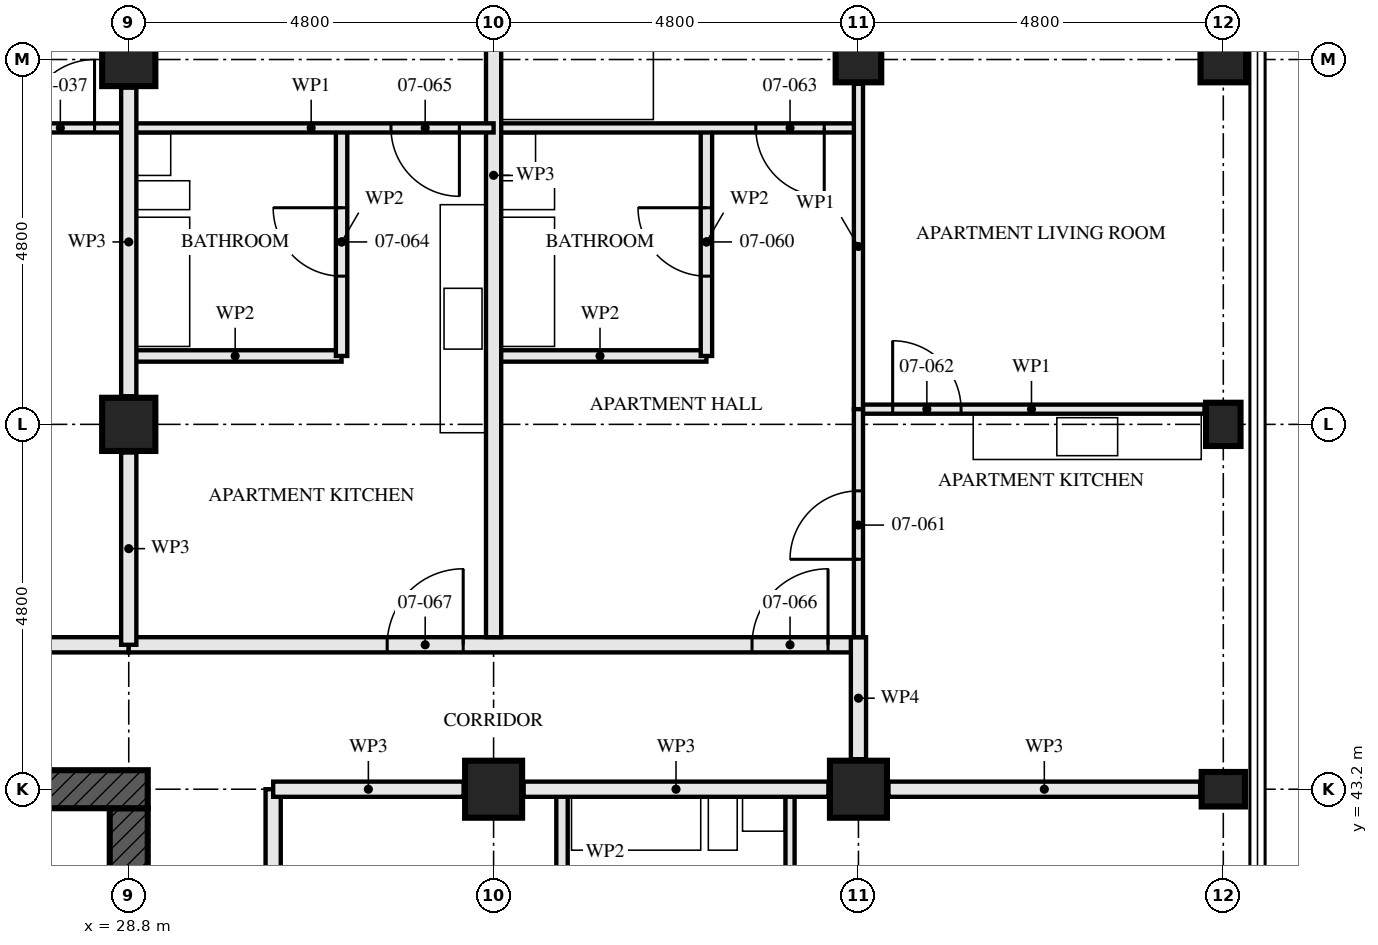
"""IFC4 building model, lengths in metres.
Left out: names, types, materials, properties, quantities, classifications, styles, units other than length and angle.
Written with IfcOpenShell. Run it as: python <this file> out.ifc"""

import sys

from ifc_helpers import new_model, si_unit, direction, frame, frame_2d, origin, origin_2d, place, context, subcontext, project, spatial, rectangle, hollow_rectangle, i_section, extrude, element, fill, save


model = new_model("IFC4")
c1 = context("Model", 3, precision=1e-05, world=origin(), true_north=direction((0.0, 1.0)))
c2 = subcontext(c1, "Body", "Model", "MODEL_VIEW")
j1 = project(units=[si_unit("LENGTHUNIT", "METRE"), si_unit("PLANEANGLEUNIT", "RADIAN")], contexts=[c1])
p1 = place(None, origin())
s1 = spatial("IfcSite", under=j1, at=p1, CompositionType="ELEMENT")
p2 = place(p1, origin())
s2 = spatial("IfcBuilding", under=s1, at=p2, CompositionType="ELEMENT")
p3 = place(p2, frame((0.0, 0.0, 30.5)))
s3 = spatial("IfcBuildingStorey", under=s2, at=p3, CompositionType="ELEMENT", Elevation=30.5)
for number, where, z_axis, x_axis in (
    (1, (28.8, 48.0, 0.0), (0.0, 0.0, 1.0), (1.0, 0.0, 0.0)),
    (2, (28.8, 52.8, 0.0), (0.0, 0.0, 1.0), (1.0, 0.0, 0.0)),
):
    element("IfcColumn", number, at=place(p3, frame(where, z_axis=z_axis, x_axis=x_axis)), inside=s3, PredefinedType="COLUMN", context=c2, shape_type="SweptSolid", body=[
        extrude(hollow_rectangle(XDim=0.7, YDim=0.7, WallThickness=0.06, at=origin_2d()), origin(), (0.0, 0.0, 1.0), 3.5),
    ])
for number, where, z_axis, x_axis in (
    (3, (33.6, 43.2, 0.0), (0.0, 0.0, 1.0), (0.0, 1.0, 0.0)),
    (4, (38.4, 43.2, 0.0), (0.0, 0.0, 1.0), (0.0, 1.0, 0.0)),
):
    element("IfcColumn", number, at=place(p3, frame(where, z_axis=z_axis, x_axis=x_axis)), inside=s3, PredefinedType="COLUMN", context=c2, shape_type="SweptSolid", body=[
        extrude(hollow_rectangle(XDim=0.75, YDim=0.75, WallThickness=0.08, at=origin_2d()), origin(), (0.0, 0.0, 1.0), 3.5),
    ])
p4 = place(p3, frame((38.4, 52.8, 0.0), z_axis=(0.0, 0.0, 1.0), x_axis=(0.0, 1.0, 0.0)))
e5 = element("IfcColumn", 5, at=p4, inside=s3, PredefinedType="COLUMN", context=c2, shape_type="SweptSolid", body=[
    extrude(hollow_rectangle(XDim=0.6, YDim=0.6, WallThickness=0.05, at=origin_2d()), origin(), (0.0, 0.0, 1.0), 3.5),
])
for number, where, z_axis, x_axis in (
    (6, (43.2, 43.2, 0.0), (0.0, 0.0, 1.0), (0.0, 1.0, 0.0)),
    (7, (43.2, 48.0, 0.0), (0.0, 0.0, 1.0), (1.0, 0.0, 0.0)),
):
    element("IfcColumn", number, at=place(p3, frame(where, z_axis=z_axis, x_axis=x_axis)), inside=s3, PredefinedType="COLUMN", context=c2, shape_type="SweptSolid", body=[
        extrude(i_section(OverallWidth=0.454, OverallDepth=0.569, WebThickness=0.078, FlangeThickness=0.125, FilletRadius=0.015, at=origin_2d()), origin(), (0.0, 0.0, 1.0), 3.5),
    ])
p5 = place(p3, frame((43.2, 52.8, 0.0), z_axis=(0.0, 0.0, 1.0), x_axis=(0.0, 1.0, 0.0)))
e8 = element("IfcColumn", 8, at=p5, inside=s3, PredefinedType="COLUMN", context=c2, shape_type="SweptSolid", body=[
    extrude(hollow_rectangle(XDim=0.6, YDim=0.6, WallThickness=0.05, at=origin_2d()), origin(), (0.0, 0.0, 1.0), 3.5),
])
p6 = place(p3, frame((29.05, 43.2, -0.17), z_axis=(0.0, 0.0, 1.0), x_axis=(-1.0, 0.0, 0.0)))
e9 = element("IfcWall", 9, at=p6, inside=s3, PredefinedType="SHEAR", context=c2, shape_type="SweptSolid", body=[
    extrude(rectangle(XDim=14.9, YDim=0.5, at=frame_2d((7.45, 0.0))), origin(), (0.0, 0.0, 1.0), 3.5),
])
p7 = place(p6, frame((6.85, 0.0, 0.17)))
e10 = element("IfcOpeningElement", 10, at=p7, cuts=e9, PredefinedType="OPENING", context=c2, shape_type="SweptSolid", body=[
    extrude(rectangle(XDim=1.2, YDim=2.1, at=frame_2d((0.6, 1.05))), frame((0.0, 0.26, 0.0), z_axis=(0.0, -1.0, 0.0), x_axis=(1.0, 0.0, 0.0)), (0.0, 0.0, 1.0), 0.521),
])
p8 = place(p3, frame((28.8, 29.05, -0.17), z_axis=(0.0, 0.0, 1.0), x_axis=(0.0, 1.0, 0.0)))
e11 = element("IfcWall", 11, at=p8, inside=s3, PredefinedType="SHEAR", context=c2, shape_type="SweptSolid", body=[
    extrude(rectangle(XDim=13.9, YDim=0.5, at=frame_2d((6.95, 0.0))), origin(), (0.0, 0.0, 1.0), 3.5),
])
p9 = place(p8, frame((6.35, 0.0, 0.17)))
e12 = element("IfcOpeningElement", 12, at=p9, cuts=e11, PredefinedType="OPENING", context=c2, shape_type="SweptSolid", body=[
    extrude(rectangle(XDim=1.2, YDim=2.1, at=frame_2d((0.6, 1.05))), frame((0.0, 0.26, 0.0), z_axis=(0.0, -1.0, 0.0), x_axis=(1.0, 0.0, 0.0)), (0.0, 0.0, 1.0), 0.521),
])
p10 = place(p3, frame((28.8, 51.9, 0.0), z_axis=(0.0, 0.0, 1.0), x_axis=(-1.0, 0.0, 0.0)))
e13 = element("IfcWall", 13, at=p10, inside=s3, PredefinedType="PARTITIONING", context=c2, shape_type="SweptSolid", body=[
    extrude(rectangle(XDim=4.8, YDim=0.12, at=frame_2d((2.4, 0.0))), origin(), (0.0, 0.0, 1.0), 3.33),
])
p11 = place(p10, frame((0.45, 0.0, 0.0)))
e14 = element("IfcOpeningElement", 14, at=p11, cuts=e13, PredefinedType="OPENING", context=c2, shape_type="SweptSolid", body=[
    extrude(rectangle(XDim=0.9, YDim=2.1, at=frame_2d((0.45, 1.05))), frame((0.0, 0.071, 0.0), z_axis=(0.0, -1.0, 0.0), x_axis=(1.0, 0.0, 0.0)), (0.0, 0.0, 1.0), 0.141),
])
p12 = place(p3, frame((28.8, 45.1, 0.0), z_axis=(0.0, 0.0, 1.0), x_axis=(-1.0, 0.0, 0.0)))
e15 = element("IfcWall", 15, at=p12, inside=s3, PredefinedType="PARTITIONING", context=c2, shape_type="SweptSolid", body=[
    extrude(rectangle(XDim=14.4, YDim=0.2, at=frame_2d((7.2, 0.0))), origin(), (0.0, 0.0, 1.0), 3.33),
])
p13 = place(p12, frame((5.2, 0.0, 0.0)))
e16 = element("IfcOpeningElement", 16, at=p13, cuts=e15, PredefinedType="OPENING", context=c2, shape_type="SweptSolid", body=[
    extrude(rectangle(XDim=1.0, YDim=2.1, at=frame_2d((0.5, 1.05))), frame((0.0, 0.111, 0.0), z_axis=(0.0, -1.0, 0.0), x_axis=(1.0, 0.0, 0.0)), (0.0, 0.0, 1.0), 0.221),
])
p14 = place(p12, frame((10.0, 0.0, 0.0)))
e17 = element("IfcOpeningElement", 17, at=p14, cuts=e15, PredefinedType="OPENING", context=c2, shape_type="SweptSolid", body=[
    extrude(rectangle(XDim=1.0, YDim=2.1, at=frame_2d((0.5, 1.05))), frame((0.0, 0.111, 0.0), z_axis=(0.0, -1.0, 0.0), x_axis=(1.0, 0.0, 0.0)), (0.0, 0.0, 1.0), 0.221),
])
p15 = place(p3, frame((34.5, 40.4, 0.0), z_axis=(0.0, 0.0, 1.0), x_axis=(0.0, 1.0, 0.0)))
e18 = element("IfcWall", 18, at=p15, inside=s3, PredefinedType="PARTITIONING", context=c2, shape_type="SweptSolid", body=[
    extrude(rectangle(XDim=2.8, YDim=0.15, at=frame_2d((1.4, 0.0))), origin(), (0.0, 0.0, 1.0), 3.33),
])
p16 = place(p3, frame((37.5, 38.4, 0.0), z_axis=(0.0, 0.0, 1.0), x_axis=(0.0, 1.0, 0.0)))
e19 = element("IfcWall", 19, at=p16, inside=s3, PredefinedType="PARTITIONING", context=c2, shape_type="SweptSolid", body=[
    extrude(rectangle(XDim=4.8, YDim=0.12, at=frame_2d((2.4, 0.0))), origin(), (0.0, 0.0, 1.0), 3.33),
])
p17 = place(p16, frame((0.45, 0.0, 0.0)))
e20 = element("IfcOpeningElement", 20, at=p17, cuts=e19, PredefinedType="OPENING", context=c2, shape_type="SweptSolid", body=[
    extrude(rectangle(XDim=0.9, YDim=2.1, at=frame_2d((0.45, 1.05))), frame((0.0, 0.071, 0.0), z_axis=(0.0, -1.0, 0.0), x_axis=(1.0, 0.0, 0.0)), (0.0, 0.0, 1.0), 0.141),
])
p18 = place(p3, frame((30.7, 28.8, 0.0), z_axis=(0.0, 0.0, 1.0), x_axis=(0.0, 1.0, 0.0)))
e21 = element("IfcWall", 21, at=p18, inside=s3, PredefinedType="PARTITIONING", context=c2, shape_type="SweptSolid", body=[
    extrude(rectangle(XDim=14.4, YDim=0.2, at=frame_2d((7.2, 0.0))), origin(), (0.0, 0.0, 1.0), 2.55),
])
p19 = place(p18, frame((1.4, 0.0, 0.0)))
e22 = element("IfcOpeningElement", 22, at=p19, cuts=e21, PredefinedType="OPENING", context=c2, shape_type="SweptSolid", body=[
    extrude(rectangle(XDim=1.0, YDim=2.1, at=frame_2d((0.5, 1.05))), frame((0.0, 0.111, 0.0), z_axis=(0.0, -1.0, 0.0), x_axis=(1.0, 0.0, 0.0)), (0.0, 0.0, 1.0), 0.221),
])
p20 = place(p18, frame((4.1, 0.0, 0.0)))
e23 = element("IfcOpeningElement", 23, at=p20, cuts=e21, PredefinedType="OPENING", context=c2, shape_type="SweptSolid", body=[
    extrude(rectangle(XDim=1.0, YDim=2.1, at=frame_2d((0.5, 1.05))), frame((0.0, 0.111, 0.0), z_axis=(0.0, -1.0, 0.0), x_axis=(1.0, 0.0, 0.0)), (0.0, 0.0, 1.0), 0.221),
])
p21 = place(p18, frame((5.975, 0.0, 0.0)))
e24 = element("IfcOpeningElement", 24, at=p21, cuts=e21, PredefinedType="OPENING", context=c2, shape_type="SweptSolid", body=[
    extrude(rectangle(XDim=1.0, YDim=2.1, at=frame_2d((0.5, 1.05))), frame((0.0, 0.111, 0.0), z_axis=(0.0, -1.0, 0.0), x_axis=(1.0, 0.0, 0.0)), (0.0, 0.0, 1.0), 0.221),
])
p22 = place(p18, frame((10.0, 0.0, 0.0)))
e25 = element("IfcOpeningElement", 25, at=p22, cuts=e21, PredefinedType="OPENING", context=c2, shape_type="SweptSolid", body=[
    extrude(rectangle(XDim=1.0, YDim=2.1, at=frame_2d((0.5, 1.05))), frame((0.0, 0.111, 0.0), z_axis=(0.0, -1.0, 0.0), x_axis=(1.0, 0.0, 0.0)), (0.0, 0.0, 1.0), 0.221),
])
p23 = place(p3, frame((36.4, 51.9, 0.0), z_axis=(0.0, 0.0, 1.0), x_axis=(0.0, -1.0, 0.0)))
e26 = element("IfcWall", 26, at=p23, inside=s3, PredefinedType="PARTITIONING", context=c2, shape_type="SweptSolid", body=[
    extrude(rectangle(XDim=3.0, YDim=0.15, at=frame_2d((1.5, 0.0))), origin(), (0.0, 0.0, 1.0), 3.33),
])
p24 = place(p23, frame((1.05, 0.0, 0.0)))
e27 = element("IfcOpeningElement", 27, at=p24, cuts=e26, PredefinedType="OPENING", context=c2, shape_type="SweptSolid", body=[
    extrude(rectangle(XDim=0.9, YDim=2.1, at=frame_2d((0.45, 1.05))), frame((0.0, 0.085, 0.0), z_axis=(0.0, -1.0, 0.0), x_axis=(1.0, 0.0, 0.0)), (0.0, 0.0, 1.0), 0.171),
])
p25 = place(p3, frame((36.4, 48.9, 0.0), z_axis=(0.0, 0.0, 1.0), x_axis=(-1.0, 0.0, 0.0)))
e28 = element("IfcWall", 28, at=p25, inside=s3, PredefinedType="PARTITIONING", context=c2, shape_type="SweptSolid", body=[
    extrude(rectangle(XDim=2.8, YDim=0.15, at=frame_2d((1.4, 0.0))), origin(), (0.0, 0.0, 1.0), 3.33),
])
p26 = place(p3, frame((38.4, 48.2, 0.0), z_axis=(0.0, 0.0, 1.0), x_axis=(0.0, -1.0, 0.0)))
e29 = element("IfcWall", 29, at=p26, inside=s3, PredefinedType="PARTITIONING", context=c2, shape_type="SweptSolid", body=[
    extrude(rectangle(XDim=3.0, YDim=0.12, at=frame_2d((1.5, 0.0))), origin(), (0.0, 0.0, 1.0), 2.55),
])
p27 = place(p26, frame((1.075, 0.0, 0.0)))
e30 = element("IfcOpeningElement", 30, at=p27, cuts=e29, PredefinedType="OPENING", context=c2, shape_type="SweptSolid", body=[
    extrude(rectangle(XDim=0.9, YDim=2.1, at=frame_2d((0.45, 1.05))), frame((0.0, 0.071, 0.0), z_axis=(0.0, -1.0, 0.0), x_axis=(1.0, 0.0, 0.0)), (0.0, 0.0, 1.0), 0.141),
])
p28 = place(p3, frame((42.953, 48.2, 0.0), z_axis=(0.0, 0.0, 1.0), x_axis=(-1.0, 0.0, 0.0)))
e31 = element("IfcWall", 31, at=p28, inside=s3, PredefinedType="PARTITIONING", context=c2, shape_type="SweptSolid", body=[
    extrude(rectangle(XDim=4.553, YDim=0.12, at=frame_2d((2.276, 0.0))), origin(), (0.0, 0.0, 1.0), 3.33),
])
p29 = place(p28, frame((3.203, 0.0, 0.0)))
e32 = element("IfcOpeningElement", 32, at=p29, cuts=e31, PredefinedType="OPENING", context=c2, shape_type="SweptSolid", body=[
    extrude(rectangle(XDim=0.9, YDim=2.1, at=frame_2d((0.45, 1.05))), frame((0.0, 0.071, 0.0), z_axis=(0.0, -1.0, 0.0), x_axis=(1.0, 0.0, 0.0)), (0.0, 0.0, 1.0), 0.141),
])
p30 = place(p3, frame((38.4, 51.9, 0.0), z_axis=(0.0, 0.0, 1.0), x_axis=(-1.0, 0.0, 0.0)))
e33 = element("IfcWall", 33, at=p30, inside=s3, PredefinedType="PARTITIONING", context=c2, shape_type="SweptSolid", body=[
    extrude(rectangle(XDim=4.8, YDim=0.12, at=frame_2d((2.4, 0.0))), origin(), (0.0, 0.0, 1.0), 3.33),
])
p31 = place(p30, frame((0.45, 0.0, 0.0)))
e34 = element("IfcOpeningElement", 34, at=p31, cuts=e33, PredefinedType="OPENING", context=c2, shape_type="SweptSolid", body=[
    extrude(rectangle(XDim=0.9, YDim=2.1, at=frame_2d((0.45, 1.05))), frame((0.0, 0.071, 0.0), z_axis=(0.0, -1.0, 0.0), x_axis=(1.0, 0.0, 0.0)), (0.0, 0.0, 1.0), 0.141),
])
p32 = place(p3, frame((38.4, 52.48, 0.0), z_axis=(0.0, 0.0, 1.0), x_axis=(0.0, -1.0, 0.0)))
e35 = element("IfcWall", 35, at=p32, inside=s3, PredefinedType="PARTITIONING", context=c2, shape_type="SweptSolid", body=[
    extrude(rectangle(XDim=4.28, YDim=0.12, at=frame_2d((2.14, 0.0))), origin(), (0.0, 0.0, 1.0), 3.33),
])
p33 = place(p3, frame((33.6, 57.353, 0.0), z_axis=(0.0, 0.0, 1.0), x_axis=(0.0, -1.0, 0.0)))
e36 = element("IfcWall", 36, at=p33, inside=s3, PredefinedType="PARTITIONING", context=c2, shape_type="SweptSolid", body=[
    extrude(rectangle(XDim=12.153, YDim=0.2, at=frame_2d((6.077, 0.0))), origin(), (0.0, 0.0, 1.0), 2.55),
])
p34 = place(p3, frame((31.6, 51.9, 0.0), z_axis=(0.0, 0.0, 1.0), x_axis=(0.0, -1.0, 0.0)))
e37 = element("IfcWall", 37, at=p34, inside=s3, PredefinedType="PARTITIONING", context=c2, shape_type="SweptSolid", body=[
    extrude(rectangle(XDim=3.0, YDim=0.15, at=frame_2d((1.5, 0.0))), origin(), (0.0, 0.0, 1.0), 3.33),
])
p35 = place(p34, frame((1.05, 0.0, 0.0)))
e38 = element("IfcOpeningElement", 38, at=p35, cuts=e37, PredefinedType="OPENING", context=c2, shape_type="SweptSolid", body=[
    extrude(rectangle(XDim=0.9, YDim=2.1, at=frame_2d((0.45, 1.05))), frame((0.0, 0.085, 0.0), z_axis=(0.0, -1.0, 0.0), x_axis=(1.0, 0.0, 0.0)), (0.0, 0.0, 1.0), 0.171),
])
p36 = place(p3, frame((31.6, 48.9, 0.0), z_axis=(0.0, 0.0, 1.0), x_axis=(-1.0, 0.0, 0.0)))
e39 = element("IfcWall", 39, at=p36, inside=s3, PredefinedType="PARTITIONING", context=c2, shape_type="SweptSolid", body=[
    extrude(rectangle(XDim=2.8, YDim=0.15, at=frame_2d((1.4, 0.0))), origin(), (0.0, 0.0, 1.0), 3.33),
])
p37 = place(p3, frame((33.6, 51.9, 0.0), z_axis=(0.0, 0.0, 1.0), x_axis=(-1.0, 0.0, 0.0)))
e40 = element("IfcWall", 40, at=p37, inside=s3, PredefinedType="PARTITIONING", context=c2, shape_type="SweptSolid", body=[
    extrude(rectangle(XDim=4.8, YDim=0.12, at=frame_2d((2.4, 0.0))), origin(), (0.0, 0.0, 1.0), 3.33),
])
p38 = place(p37, frame((0.45, 0.0, 0.0)))
e41 = element("IfcOpeningElement", 41, at=p38, cuts=e40, PredefinedType="OPENING", context=c2, shape_type="SweptSolid", body=[
    extrude(rectangle(XDim=0.9, YDim=2.1, at=frame_2d((0.45, 1.05))), frame((0.0, 0.071, 0.0), z_axis=(0.0, -1.0, 0.0), x_axis=(1.0, 0.0, 0.0)), (0.0, 0.0, 1.0), 0.141),
])
p39 = place(p3, frame((38.4, 45.1, 0.0), z_axis=(0.0, 0.0, 1.0), x_axis=(-1.0, 0.0, 0.0)))
e42 = element("IfcWall", 42, at=p39, inside=s3, PredefinedType="PARTITIONING", context=c2, shape_type="SweptSolid", body=[
    extrude(rectangle(XDim=9.6, YDim=0.2, at=frame_2d((4.8, 0.0))), origin(), (0.0, 0.0, 1.0), 3.33),
])
p40 = place(p39, frame((0.4, 0.0, 0.0)))
e43 = element("IfcOpeningElement", 43, at=p40, cuts=e42, PredefinedType="OPENING", context=c2, shape_type="SweptSolid", body=[
    extrude(rectangle(XDim=1.0, YDim=2.1, at=frame_2d((0.5, 1.05))), frame((0.0, 0.111, 0.0), z_axis=(0.0, -1.0, 0.0), x_axis=(1.0, 0.0, 0.0)), (0.0, 0.0, 1.0), 0.221),
])
p41 = place(p39, frame((5.2, 0.0, 0.0)))
e44 = element("IfcOpeningElement", 44, at=p41, cuts=e42, PredefinedType="OPENING", context=c2, shape_type="SweptSolid", body=[
    extrude(rectangle(XDim=1.0, YDim=2.1, at=frame_2d((0.5, 1.05))), frame((0.0, 0.111, 0.0), z_axis=(0.0, -1.0, 0.0), x_axis=(1.0, 0.0, 0.0)), (0.0, 0.0, 1.0), 0.221),
])
p42 = place(p3, frame((38.4, 45.2, 0.0), z_axis=(0.0, 0.0, 1.0), x_axis=(0.0, -1.0, 0.0)))
e45 = element("IfcWall", 45, at=p42, inside=s3, PredefinedType="PARTITIONING", context=c2, shape_type="SweptSolid", body=[
    extrude(rectangle(XDim=1.605, YDim=0.2, at=frame_2d((0.802, 0.0))), origin(), (0.0, 0.0, 1.0), 3.33),
])
p43 = place(p3, frame((28.8, 45.1, 0.0), z_axis=(0.0, 0.0, 1.0), x_axis=(0.0, 1.0, 0.0)))
e46 = element("IfcWall", 46, at=p43, inside=s3, PredefinedType="PARTITIONING", context=c2, shape_type="SweptSolid", body=[
    extrude(rectangle(XDim=2.53, YDim=0.2, at=frame_2d((1.265, 0.0))), origin(), (0.0, 0.0, 1.0), 2.32),
])
p44 = place(p3, frame((28.8, 48.37, 0.0), z_axis=(0.0, 0.0, 1.0), x_axis=(0.0, 1.0, 0.0)))
e47 = element("IfcWall", 47, at=p44, inside=s3, PredefinedType="PARTITIONING", context=c2, shape_type="SweptSolid", body=[
    extrude(rectangle(XDim=4.06, YDim=0.2, at=frame_2d((2.03, 0.0))), origin(), (0.0, 0.0, 1.0), 2.32),
])
p45 = place(p3, frame((42.896, 43.2, 0.0), z_axis=(0.0, 0.0, 1.0), x_axis=(-1.0, 0.0, 0.0)))
e48 = element("IfcWall", 48, at=p45, inside=s3, PredefinedType="PARTITIONING", context=c2, shape_type="SweptSolid", body=[
    extrude(rectangle(XDim=4.101, YDim=0.2, at=frame_2d((2.05, 0.0))), origin(), (0.0, 0.0, 1.0), 2.32),
])
p46 = place(p3, frame((38.005, 43.2, 0.0), z_axis=(0.0, 0.0, 1.0), x_axis=(-1.0, 0.0, 0.0)))
e49 = element("IfcWall", 49, at=p46, inside=s3, PredefinedType="PARTITIONING", context=c2, shape_type="SweptSolid", body=[
    extrude(rectangle(XDim=4.01, YDim=0.2, at=frame_2d((2.005, 0.0))), origin(), (0.0, 0.0, 1.0), 2.32),
])
p47 = place(p3, frame((33.205, 43.2, 0.0), z_axis=(0.0, 0.0, 1.0), x_axis=(-1.0, 0.0, 0.0)))
e50 = element("IfcWall", 50, at=p47, inside=s3, PredefinedType="PARTITIONING", context=c2, shape_type="SweptSolid", body=[
    extrude(rectangle(XDim=2.505, YDim=0.2, at=frame_2d((1.252, 0.0))), origin(), (0.0, 0.0, 1.0), 2.32),
])
p48 = place(p11, frame((0.9, 0.0, 0.0), z_axis=(0.0, 0.0, 1.0), x_axis=(-1.0, 0.0, 0.0)))
e51 = element("IfcDoor", 51, at=p48, inside=s3, OperationType="SINGLE_SWING_LEFT", PredefinedType="DOOR", context=c2, shape_type="SweptSolid", body=[
    extrude(rectangle(XDim=0.9, YDim=2.1, at=frame_2d((0.45, 1.05))), frame((0.0, 0.022, 0.0), z_axis=(0.0, -1.0, 0.0), x_axis=(1.0, 0.0, 0.0)), (0.0, 0.0, 1.0), 0.044),
])
fill(e14, e51)
p49 = place(p24, frame((0.9, 0.0, 0.0), z_axis=(0.0, 0.0, 1.0), x_axis=(-1.0, 0.0, 0.0)))
e52 = element("IfcDoor", 52, at=p49, inside=s3, OperationType="SINGLE_SWING_LEFT", PredefinedType="DOOR", context=c2, shape_type="SweptSolid", body=[
    extrude(rectangle(XDim=0.9, YDim=2.1, at=frame_2d((0.45, 1.05))), frame((0.0, 0.022, 0.0), z_axis=(0.0, -1.0, 0.0), x_axis=(1.0, 0.0, 0.0)), (0.0, 0.0, 1.0), 0.044),
])
fill(e27, e52)
p50 = place(p27, frame((0.9, 0.0, 0.0), z_axis=(0.0, 0.0, 1.0), x_axis=(-1.0, 0.0, 0.0)))
e53 = element("IfcDoor", 53, at=p50, inside=s3, OperationType="SINGLE_SWING_RIGHT", PredefinedType="DOOR", context=c2, shape_type="SweptSolid", body=[
    extrude(rectangle(XDim=0.9, YDim=2.1, at=frame_2d((0.45, 1.05))), frame((0.0, 0.022, 0.0), z_axis=(0.0, -1.0, 0.0), x_axis=(1.0, 0.0, 0.0)), (0.0, 0.0, 1.0), 0.044),
])
fill(e30, e53)
p51 = place(p29, frame((0.9, 0.0, 0.0), z_axis=(0.0, 0.0, 1.0), x_axis=(-1.0, 0.0, 0.0)))
e54 = element("IfcDoor", 54, at=p51, inside=s3, OperationType="SINGLE_SWING_RIGHT", PredefinedType="DOOR", context=c2, shape_type="SweptSolid", body=[
    extrude(rectangle(XDim=0.9, YDim=2.1, at=frame_2d((0.45, 1.05))), frame((0.0, 0.022, 0.0), z_axis=(0.0, -1.0, 0.0), x_axis=(1.0, 0.0, 0.0)), (0.0, 0.0, 1.0), 0.044),
])
fill(e32, e54)
p52 = place(p31, origin())
e55 = element("IfcDoor", 55, at=p52, inside=s3, OperationType="SINGLE_SWING_RIGHT", PredefinedType="DOOR", context=c2, shape_type="SweptSolid", body=[
    extrude(rectangle(XDim=0.9, YDim=2.1, at=frame_2d((0.45, 1.05))), frame((0.0, 0.022, 0.0), z_axis=(0.0, -1.0, 0.0), x_axis=(1.0, 0.0, 0.0)), (0.0, 0.0, 1.0), 0.044),
])
fill(e34, e55)
p53 = place(p35, frame((0.9, 0.0, 0.0), z_axis=(0.0, 0.0, 1.0), x_axis=(-1.0, 0.0, 0.0)))
e56 = element("IfcDoor", 56, at=p53, inside=s3, OperationType="SINGLE_SWING_LEFT", PredefinedType="DOOR", context=c2, shape_type="SweptSolid", body=[
    extrude(rectangle(XDim=0.9, YDim=2.1, at=frame_2d((0.45, 1.05))), frame((0.0, 0.022, 0.0), z_axis=(0.0, -1.0, 0.0), x_axis=(1.0, 0.0, 0.0)), (0.0, 0.0, 1.0), 0.044),
])
fill(e38, e56)
p54 = place(p38, origin())
e57 = element("IfcDoor", 57, at=p54, inside=s3, OperationType="SINGLE_SWING_RIGHT", PredefinedType="DOOR", context=c2, shape_type="SweptSolid", body=[
    extrude(rectangle(XDim=0.9, YDim=2.1, at=frame_2d((0.45, 1.05))), frame((0.0, 0.022, 0.0), z_axis=(0.0, -1.0, 0.0), x_axis=(1.0, 0.0, 0.0)), (0.0, 0.0, 1.0), 0.044),
])
fill(e41, e57)
p55 = place(p40, frame((1.0, 0.0, 0.0), z_axis=(0.0, 0.0, 1.0), x_axis=(-1.0, 0.0, 0.0)))
e58 = element("IfcDoor", 58, at=p55, inside=s3, OperationType="SINGLE_SWING_LEFT", PredefinedType="DOOR", context=c2, shape_type="SweptSolid", body=[
    extrude(rectangle(XDim=1.0, YDim=2.1, at=frame_2d((0.5, 1.05))), frame((0.0, 0.027, 0.0), z_axis=(0.0, -1.0, 0.0), x_axis=(1.0, 0.0, 0.0)), (0.0, 0.0, 1.0), 0.054),
])
fill(e43, e58)
p56 = place(p41, frame((1.0, 0.0, 0.0), z_axis=(0.0, 0.0, 1.0), x_axis=(-1.0, 0.0, 0.0)))
e59 = element("IfcDoor", 59, at=p56, inside=s3, OperationType="SINGLE_SWING_LEFT", PredefinedType="DOOR", context=c2, shape_type="SweptSolid", body=[
    extrude(rectangle(XDim=1.0, YDim=2.1, at=frame_2d((0.5, 1.05))), frame((0.0, 0.027, 0.0), z_axis=(0.0, -1.0, 0.0), x_axis=(1.0, 0.0, 0.0)), (0.0, 0.0, 1.0), 0.054),
])
fill(e44, e59)
save(model, sys.argv[1])
